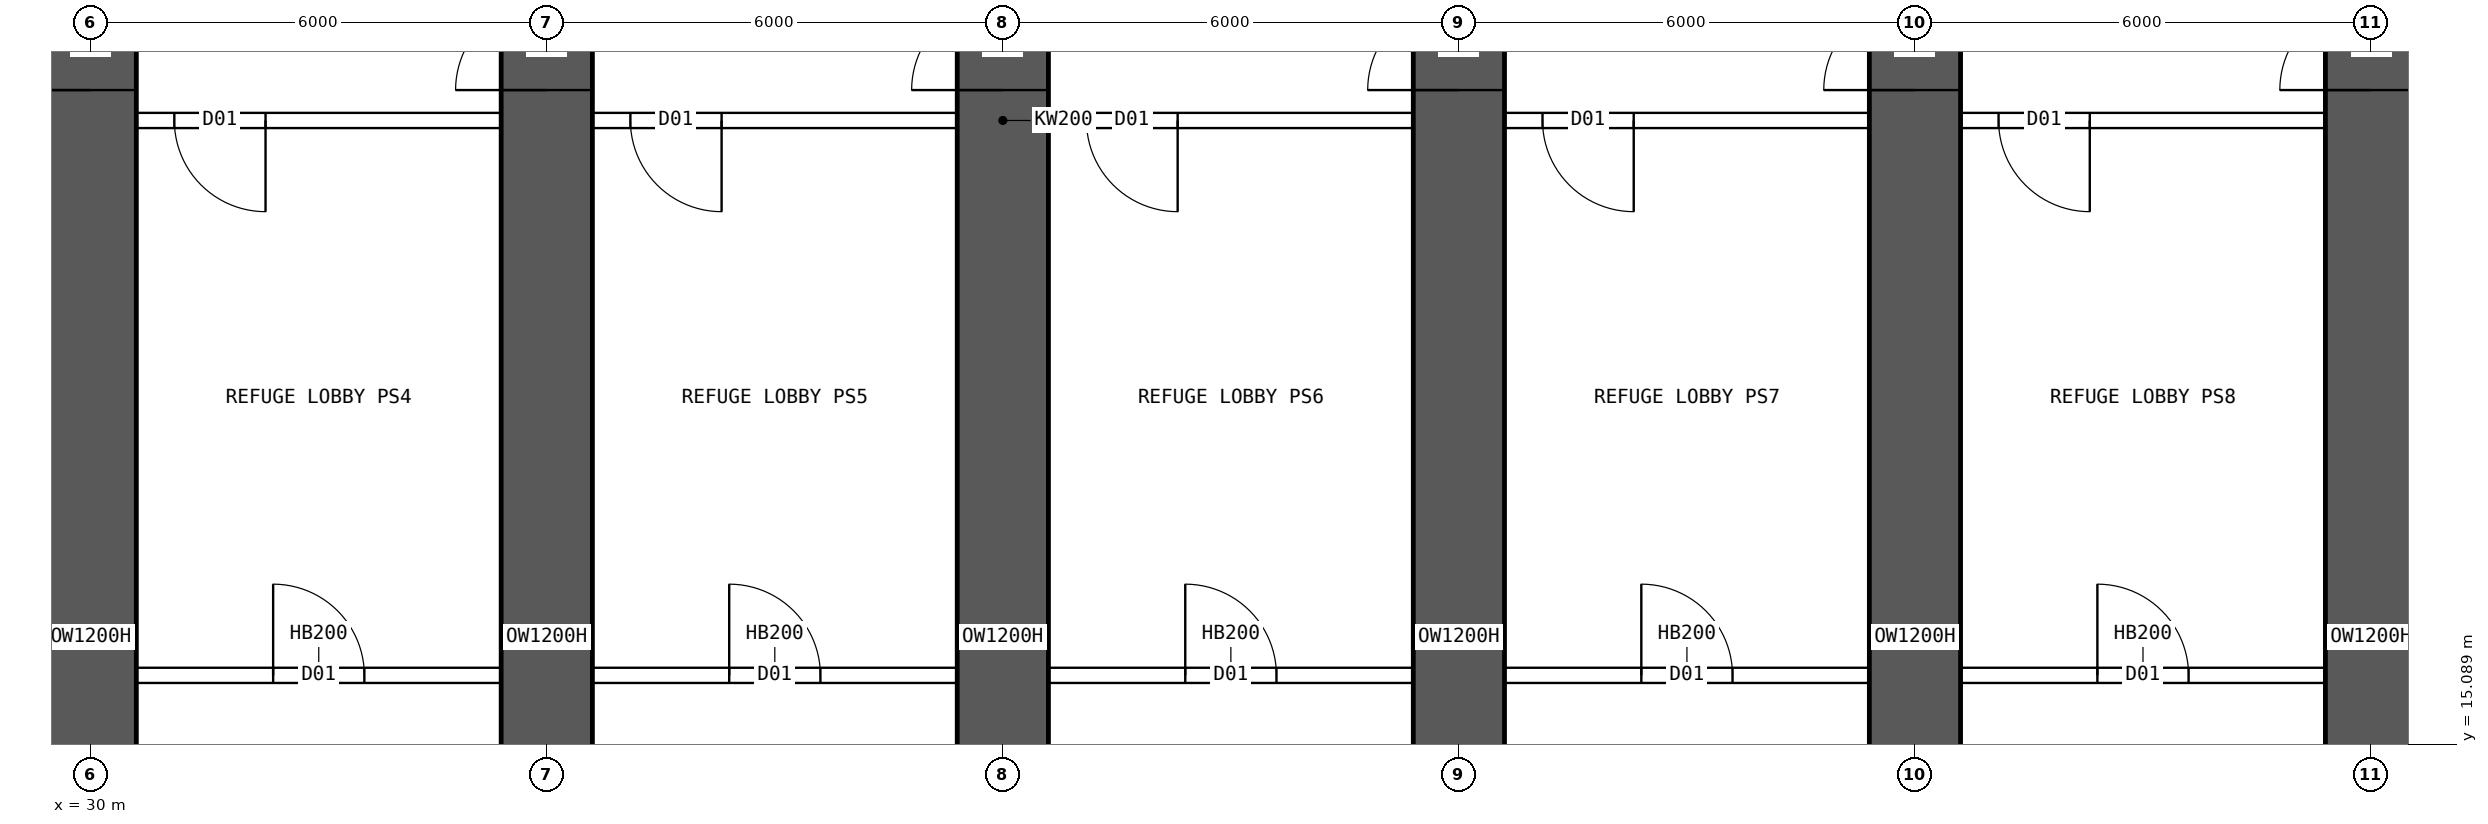
"""IFC4 building model, lengths in metres.
Left out: names, types, materials, properties, quantities, classifications, styles, units other than length and angle.
Written with IfcOpenShell. Run it as: python <this file> out.ifc"""

import sys

from ifc_helpers import new_model, si_unit, direction, frame, frame_2d, origin, place, context, subcontext, project, spatial, rectangle, extrude, element, fill, save


model = new_model("IFC4")
c1 = context("Model", 3, precision=1e-05, world=origin(), true_north=direction((0.0, 1.0)))
c2 = subcontext(c1, "Body", "Model", "MODEL_VIEW")
j1 = project(units=[si_unit("LENGTHUNIT", "METRE"), si_unit("PLANEANGLEUNIT", "RADIAN")], contexts=[c1])
p1 = place(None, origin())
s1 = spatial("IfcSite", under=j1, at=p1, CompositionType="ELEMENT")
p2 = place(p1, origin())
s2 = spatial("IfcBuilding", under=s1, at=p2, CompositionType="ELEMENT")
p3 = place(p2, frame((0.0, 0.0, 68.95)))
s3 = spatial("IfcBuildingStorey", under=s2, at=p3, CompositionType="ELEMENT", Elevation=68.95)
p4 = place(p3, frame((30.0, 7.7, 0.0), z_axis=(0.0, 0.0, 1.0), x_axis=(0.0, 1.0, 0.0)))
e1 = element("IfcWall", 1, at=p4, inside=s3, PredefinedType="SHEAR", context=c2, shape_type="SweptSolid", body=[
    extrude(rectangle(XDim=17.6, YDim=1.2, at=frame_2d((8.8, 0.0))), origin(), (0.0, 0.0, 1.0), 7.2),
])
p5 = place(p4, frame((16.0, 0.0, 0.0)))
e2 = element("IfcOpeningElement", 2, at=p5, cuts=e1, PredefinedType="OPENING", context=c2, shape_type="SweptSolid", body=[
    extrude(rectangle(XDim=1.2, YDim=2.1, at=frame_2d((0.6, 1.05))), frame((0.0, 0.61, 0.0), z_axis=(0.0, -1.0, 0.0), x_axis=(1.0, 0.0, 0.0)), (0.0, 0.0, 1.0), 1.22),
])
p6 = place(p3, frame((36.0, 7.7, 0.0), z_axis=(0.0, 0.0, 1.0), x_axis=(0.0, 1.0, 0.0)))
e3 = element("IfcWall", 3, at=p6, inside=s3, PredefinedType="SHEAR", context=c2, shape_type="SweptSolid", body=[
    extrude(rectangle(XDim=17.6, YDim=1.2, at=frame_2d((8.8, 0.0))), origin(), (0.0, 0.0, 1.0), 7.2),
])
p7 = place(p6, frame((16.0, 0.0, 0.0)))
e4 = element("IfcOpeningElement", 4, at=p7, cuts=e3, PredefinedType="OPENING", context=c2, shape_type="SweptSolid", body=[
    extrude(rectangle(XDim=1.2, YDim=2.1, at=frame_2d((0.6, 1.05))), frame((0.0, 0.61, 0.0), z_axis=(0.0, -1.0, 0.0), x_axis=(1.0, 0.0, 0.0)), (0.0, 0.0, 1.0), 1.22),
])
p8 = place(p3, frame((42.0, 7.7, 0.0), z_axis=(0.0, 0.0, 1.0), x_axis=(0.0, 1.0, 0.0)))
e5 = element("IfcWall", 5, at=p8, inside=s3, PredefinedType="SHEAR", context=c2, shape_type="SweptSolid", body=[
    extrude(rectangle(XDim=17.6, YDim=1.2, at=frame_2d((8.8, 0.0))), origin(), (0.0, 0.0, 1.0), 7.2),
])
p9 = place(p8, frame((16.0, 0.0, 0.0)))
e6 = element("IfcOpeningElement", 6, at=p9, cuts=e5, PredefinedType="OPENING", context=c2, shape_type="SweptSolid", body=[
    extrude(rectangle(XDim=1.2, YDim=2.1, at=frame_2d((0.6, 1.05))), frame((0.0, 0.61, 0.0), z_axis=(0.0, -1.0, 0.0), x_axis=(1.0, 0.0, 0.0)), (0.0, 0.0, 1.0), 1.22),
])
p10 = place(p3, frame((48.0, 7.7, 0.0), z_axis=(0.0, 0.0, 1.0), x_axis=(0.0, 1.0, 0.0)))
e7 = element("IfcWall", 7, at=p10, inside=s3, PredefinedType="SHEAR", context=c2, shape_type="SweptSolid", body=[
    extrude(rectangle(XDim=17.6, YDim=1.2, at=frame_2d((8.8, 0.0))), origin(), (0.0, 0.0, 1.0), 7.2),
])
p11 = place(p10, frame((16.0, 0.0, 0.0)))
e8 = element("IfcOpeningElement", 8, at=p11, cuts=e7, PredefinedType="OPENING", context=c2, shape_type="SweptSolid", body=[
    extrude(rectangle(XDim=1.2, YDim=2.1, at=frame_2d((0.6, 1.05))), frame((0.0, 0.61, 0.0), z_axis=(0.0, -1.0, 0.0), x_axis=(1.0, 0.0, 0.0)), (0.0, 0.0, 1.0), 1.22),
])
p12 = place(p3, frame((54.0, 7.7, 0.0), z_axis=(0.0, 0.0, 1.0), x_axis=(0.0, 1.0, 0.0)))
e9 = element("IfcWall", 9, at=p12, inside=s3, PredefinedType="SHEAR", context=c2, shape_type="SweptSolid", body=[
    extrude(rectangle(XDim=17.6, YDim=1.2, at=frame_2d((8.8, 0.0))), origin(), (0.0, 0.0, 1.0), 7.2),
])
p13 = place(p12, frame((16.0, 0.0, 0.0)))
e10 = element("IfcOpeningElement", 10, at=p13, cuts=e9, PredefinedType="OPENING", context=c2, shape_type="SweptSolid", body=[
    extrude(rectangle(XDim=1.2, YDim=2.1, at=frame_2d((0.6, 1.05))), frame((0.0, 0.61, 0.0), z_axis=(0.0, -1.0, 0.0), x_axis=(1.0, 0.0, 0.0)), (0.0, 0.0, 1.0), 1.22),
])
p14 = place(p3, frame((60.0, 7.7, 0.0), z_axis=(0.0, 0.0, 1.0), x_axis=(0.0, 1.0, 0.0)))
e11 = element("IfcWall", 11, at=p14, inside=s3, PredefinedType="SHEAR", context=c2, shape_type="SweptSolid", body=[
    extrude(rectangle(XDim=17.6, YDim=1.2, at=frame_2d((8.8, 0.0))), origin(), (0.0, 0.0, 1.0), 7.2),
])
p15 = place(p14, frame((16.0, 0.0, 0.0)))
e12 = element("IfcOpeningElement", 12, at=p15, cuts=e11, PredefinedType="OPENING", context=c2, shape_type="SweptSolid", body=[
    extrude(rectangle(XDim=1.2, YDim=2.1, at=frame_2d((0.6, 1.05))), frame((0.0, 0.61, 0.0), z_axis=(0.0, -1.0, 0.0), x_axis=(1.0, 0.0, 0.0)), (0.0, 0.0, 1.0), 1.22),
])
p16 = place(p3, frame((68.4, 23.3, 0.0), z_axis=(0.0, 0.0, 1.0), x_axis=(-1.0, 0.0, 0.0)))
e13 = element("IfcWall", 13, at=p16, inside=s3, PredefinedType="SOLIDWALL", context=c2, shape_type="SweptSolid", body=[
    extrude(rectangle(XDim=52.8, YDim=0.2, at=frame_2d((26.4, 0.0))), origin(), (0.0, 0.0, 1.0), 6.9),
])
p17 = place(p16, frame((51.0, 0.0, 0.0)))
e14 = element("IfcOpeningElement", 14, at=p17, cuts=e13, PredefinedType="OPENING", context=c2, shape_type="SweptSolid", body=[
    extrude(rectangle(XDim=1.2, YDim=2.1, at=frame_2d((0.6, 1.05))), frame((0.0, 0.11, 0.0), z_axis=(0.0, -1.0, 0.0), x_axis=(1.0, 0.0, 0.0)), (0.0, 0.0, 1.0), 0.22),
])
p18 = place(p16, frame((48.1, 0.0, 0.0)))
e15 = element("IfcOpeningElement", 15, at=p18, cuts=e13, PredefinedType="OPENING", context=c2, shape_type="SweptSolid", body=[
    extrude(rectangle(XDim=1.2, YDim=2.1, at=frame_2d((0.6, 1.05))), frame((0.0, 0.11, 0.0), z_axis=(0.0, -1.0, 0.0), x_axis=(1.0, 0.0, 0.0)), (0.0, 0.0, 1.0), 0.22),
])
p19 = place(p16, frame((42.1, 0.0, 0.0)))
e16 = element("IfcOpeningElement", 16, at=p19, cuts=e13, PredefinedType="OPENING", context=c2, shape_type="SweptSolid", body=[
    extrude(rectangle(XDim=1.2, YDim=2.1, at=frame_2d((0.6, 1.05))), frame((0.0, 0.11, 0.0), z_axis=(0.0, -1.0, 0.0), x_axis=(1.0, 0.0, 0.0)), (0.0, 0.0, 1.0), 0.22),
])
p20 = place(p16, frame((36.1, 0.0, 0.0)))
e17 = element("IfcOpeningElement", 17, at=p20, cuts=e13, PredefinedType="OPENING", context=c2, shape_type="SweptSolid", body=[
    extrude(rectangle(XDim=1.2, YDim=2.1, at=frame_2d((0.6, 1.05))), frame((0.0, 0.11, 0.0), z_axis=(0.0, -1.0, 0.0), x_axis=(1.0, 0.0, 0.0)), (0.0, 0.0, 1.0), 0.22),
])
p21 = place(p16, frame((30.1, 0.0, 0.0)))
e18 = element("IfcOpeningElement", 18, at=p21, cuts=e13, PredefinedType="OPENING", context=c2, shape_type="SweptSolid", body=[
    extrude(rectangle(XDim=1.2, YDim=2.1, at=frame_2d((0.6, 1.05))), frame((0.0, 0.11, 0.0), z_axis=(0.0, -1.0, 0.0), x_axis=(1.0, 0.0, 0.0)), (0.0, 0.0, 1.0), 0.22),
])
p22 = place(p16, frame((24.1, 0.0, 0.0)))
e19 = element("IfcOpeningElement", 19, at=p22, cuts=e13, PredefinedType="OPENING", context=c2, shape_type="SweptSolid", body=[
    extrude(rectangle(XDim=1.2, YDim=2.1, at=frame_2d((0.6, 1.05))), frame((0.0, 0.11, 0.0), z_axis=(0.0, -1.0, 0.0), x_axis=(1.0, 0.0, 0.0)), (0.0, 0.0, 1.0), 0.22),
])
p23 = place(p16, frame((18.1, 0.0, 0.0)))
e20 = element("IfcOpeningElement", 20, at=p23, cuts=e13, PredefinedType="OPENING", context=c2, shape_type="SweptSolid", body=[
    extrude(rectangle(XDim=1.2, YDim=2.1, at=frame_2d((0.6, 1.05))), frame((0.0, 0.11, 0.0), z_axis=(0.0, -1.0, 0.0), x_axis=(1.0, 0.0, 0.0)), (0.0, 0.0, 1.0), 0.22),
])
p24 = place(p16, frame((12.1, 0.0, 0.0)))
e21 = element("IfcOpeningElement", 21, at=p24, cuts=e13, PredefinedType="OPENING", context=c2, shape_type="SweptSolid", body=[
    extrude(rectangle(XDim=1.2, YDim=2.1, at=frame_2d((0.6, 1.05))), frame((0.0, 0.11, 0.0), z_axis=(0.0, -1.0, 0.0), x_axis=(1.0, 0.0, 0.0)), (0.0, 0.0, 1.0), 0.22),
])
p25 = place(p16, frame((6.1, 0.0, 0.0)))
e22 = element("IfcOpeningElement", 22, at=p25, cuts=e13, PredefinedType="OPENING", context=c2, shape_type="SweptSolid", body=[
    extrude(rectangle(XDim=1.2, YDim=2.1, at=frame_2d((0.6, 1.05))), frame((0.0, 0.11, 0.0), z_axis=(0.0, -1.0, 0.0), x_axis=(1.0, 0.0, 0.0)), (0.0, 0.0, 1.0), 0.22),
])
p26 = place(p16, frame((0.1, 0.0, 0.0)))
e23 = element("IfcOpeningElement", 23, at=p26, cuts=e13, PredefinedType="OPENING", context=c2, shape_type="SweptSolid", body=[
    extrude(rectangle(XDim=1.2, YDim=2.1, at=frame_2d((0.6, 1.05))), frame((0.0, 0.11, 0.0), z_axis=(0.0, -1.0, 0.0), x_axis=(1.0, 0.0, 0.0)), (0.0, 0.0, 1.0), 0.22),
])
p27 = place(p3, frame((30.5, 16.0, 0.0), z_axis=(0.0, 0.0, 1.0), x_axis=(1.0, 0.0, 0.0)))
e24 = element("IfcWall", 24, at=p27, inside=s3, PredefinedType="SOLIDWALL", context=c2, shape_type="SweptSolid", body=[
    extrude(rectangle(XDim=5.0, YDim=0.2, at=frame_2d((2.5, 0.0))), origin(), (0.0, 0.0, 1.0), 6.9),
])
p28 = place(p27, frame((1.9, 0.0, 0.0)))
e25 = element("IfcOpeningElement", 25, at=p28, cuts=e24, PredefinedType="OPENING", context=c2, shape_type="SweptSolid", body=[
    extrude(rectangle(XDim=1.2, YDim=2.1, at=frame_2d((0.6, 1.05))), frame((0.0, 0.11, 0.0), z_axis=(0.0, -1.0, 0.0), x_axis=(1.0, 0.0, 0.0)), (0.0, 0.0, 1.0), 0.22),
])
p29 = place(p3, frame((36.5, 16.0, 0.0), z_axis=(0.0, 0.0, 1.0), x_axis=(1.0, 0.0, 0.0)))
e26 = element("IfcWall", 26, at=p29, inside=s3, PredefinedType="SOLIDWALL", context=c2, shape_type="SweptSolid", body=[
    extrude(rectangle(XDim=5.0, YDim=0.2, at=frame_2d((2.5, 0.0))), origin(), (0.0, 0.0, 1.0), 6.9),
])
p30 = place(p29, frame((1.9, 0.0, 0.0)))
e27 = element("IfcOpeningElement", 27, at=p30, cuts=e26, PredefinedType="OPENING", context=c2, shape_type="SweptSolid", body=[
    extrude(rectangle(XDim=1.2, YDim=2.1, at=frame_2d((0.6, 1.05))), frame((0.0, 0.11, 0.0), z_axis=(0.0, -1.0, 0.0), x_axis=(1.0, 0.0, 0.0)), (0.0, 0.0, 1.0), 0.22),
])
p31 = place(p3, frame((42.5, 16.0, 0.0), z_axis=(0.0, 0.0, 1.0), x_axis=(1.0, 0.0, 0.0)))
e28 = element("IfcWall", 28, at=p31, inside=s3, PredefinedType="SOLIDWALL", context=c2, shape_type="SweptSolid", body=[
    extrude(rectangle(XDim=5.0, YDim=0.2, at=frame_2d((2.5, 0.0))), origin(), (0.0, 0.0, 1.0), 6.9),
])
p32 = place(p31, frame((1.9, 0.0, 0.0)))
e29 = element("IfcOpeningElement", 29, at=p32, cuts=e28, PredefinedType="OPENING", context=c2, shape_type="SweptSolid", body=[
    extrude(rectangle(XDim=1.2, YDim=2.1, at=frame_2d((0.6, 1.05))), frame((0.0, 0.11, 0.0), z_axis=(0.0, -1.0, 0.0), x_axis=(1.0, 0.0, 0.0)), (0.0, 0.0, 1.0), 0.22),
])
p33 = place(p3, frame((48.5, 16.0, 0.0), z_axis=(0.0, 0.0, 1.0), x_axis=(1.0, 0.0, 0.0)))
e30 = element("IfcWall", 30, at=p33, inside=s3, PredefinedType="SOLIDWALL", context=c2, shape_type="SweptSolid", body=[
    extrude(rectangle(XDim=5.0, YDim=0.2, at=frame_2d((2.5, 0.0))), origin(), (0.0, 0.0, 1.0), 6.9),
])
p34 = place(p33, frame((1.9, 0.0, 0.0)))
e31 = element("IfcOpeningElement", 31, at=p34, cuts=e30, PredefinedType="OPENING", context=c2, shape_type="SweptSolid", body=[
    extrude(rectangle(XDim=1.2, YDim=2.1, at=frame_2d((0.6, 1.05))), frame((0.0, 0.11, 0.0), z_axis=(0.0, -1.0, 0.0), x_axis=(1.0, 0.0, 0.0)), (0.0, 0.0, 1.0), 0.22),
])
p35 = place(p3, frame((54.5, 16.0, 0.0), z_axis=(0.0, 0.0, 1.0), x_axis=(1.0, 0.0, 0.0)))
e32 = element("IfcWall", 32, at=p35, inside=s3, PredefinedType="SOLIDWALL", context=c2, shape_type="SweptSolid", body=[
    extrude(rectangle(XDim=5.0, YDim=0.2, at=frame_2d((2.5, 0.0))), origin(), (0.0, 0.0, 1.0), 6.9),
])
p36 = place(p35, frame((1.9, 0.0, 0.0)))
e33 = element("IfcOpeningElement", 33, at=p36, cuts=e32, PredefinedType="OPENING", context=c2, shape_type="SweptSolid", body=[
    extrude(rectangle(XDim=1.2, YDim=2.1, at=frame_2d((0.6, 1.05))), frame((0.0, 0.11, 0.0), z_axis=(0.0, -1.0, 0.0), x_axis=(1.0, 0.0, 0.0)), (0.0, 0.0, 1.0), 0.22),
])
p37 = place(p28, origin())
e34 = element("IfcDoor", 34, at=p37, inside=s3, OperationType="SINGLE_SWING_LEFT", PredefinedType="DOOR", context=c2, shape_type="SweptSolid", body=[
    extrude(rectangle(XDim=1.2, YDim=2.1, at=frame_2d((0.6, 1.05))), frame((0.0, 0.025, 0.0), z_axis=(0.0, -1.0, 0.0), x_axis=(1.0, 0.0, 0.0)), (0.0, 0.0, 1.0), 0.05),
])
fill(e25, e34)
p38 = place(p30, origin())
e35 = element("IfcDoor", 35, at=p38, inside=s3, OperationType="SINGLE_SWING_LEFT", PredefinedType="DOOR", context=c2, shape_type="SweptSolid", body=[
    extrude(rectangle(XDim=1.2, YDim=2.1, at=frame_2d((0.6, 1.05))), frame((0.0, 0.025, 0.0), z_axis=(0.0, -1.0, 0.0), x_axis=(1.0, 0.0, 0.0)), (0.0, 0.0, 1.0), 0.05),
])
fill(e27, e35)
p39 = place(p32, origin())
e36 = element("IfcDoor", 36, at=p39, inside=s3, OperationType="SINGLE_SWING_LEFT", PredefinedType="DOOR", context=c2, shape_type="SweptSolid", body=[
    extrude(rectangle(XDim=1.2, YDim=2.1, at=frame_2d((0.6, 1.05))), frame((0.0, 0.025, 0.0), z_axis=(0.0, -1.0, 0.0), x_axis=(1.0, 0.0, 0.0)), (0.0, 0.0, 1.0), 0.05),
])
fill(e29, e36)
p40 = place(p34, origin())
e37 = element("IfcDoor", 37, at=p40, inside=s3, OperationType="SINGLE_SWING_LEFT", PredefinedType="DOOR", context=c2, shape_type="SweptSolid", body=[
    extrude(rectangle(XDim=1.2, YDim=2.1, at=frame_2d((0.6, 1.05))), frame((0.0, 0.025, 0.0), z_axis=(0.0, -1.0, 0.0), x_axis=(1.0, 0.0, 0.0)), (0.0, 0.0, 1.0), 0.05),
])
fill(e31, e37)
p41 = place(p36, origin())
e38 = element("IfcDoor", 38, at=p41, inside=s3, OperationType="SINGLE_SWING_LEFT", PredefinedType="DOOR", context=c2, shape_type="SweptSolid", body=[
    extrude(rectangle(XDim=1.2, YDim=2.1, at=frame_2d((0.6, 1.05))), frame((0.0, 0.025, 0.0), z_axis=(0.0, -1.0, 0.0), x_axis=(1.0, 0.0, 0.0)), (0.0, 0.0, 1.0), 0.05),
])
fill(e33, e38)
p42 = place(p20, origin())
e39 = element("IfcDoor", 39, at=p42, inside=s3, OperationType="SINGLE_SWING_LEFT", PredefinedType="DOOR", context=c2, shape_type="SweptSolid", body=[
    extrude(rectangle(XDim=1.2, YDim=2.1, at=frame_2d((0.6, 1.05))), frame((0.0, 0.025, 0.0), z_axis=(0.0, -1.0, 0.0), x_axis=(1.0, 0.0, 0.0)), (0.0, 0.0, 1.0), 0.05),
])
fill(e17, e39)
p43 = place(p21, origin())
e40 = element("IfcDoor", 40, at=p43, inside=s3, OperationType="SINGLE_SWING_LEFT", PredefinedType="DOOR", context=c2, shape_type="SweptSolid", body=[
    extrude(rectangle(XDim=1.2, YDim=2.1, at=frame_2d((0.6, 1.05))), frame((0.0, 0.025, 0.0), z_axis=(0.0, -1.0, 0.0), x_axis=(1.0, 0.0, 0.0)), (0.0, 0.0, 1.0), 0.05),
])
fill(e18, e40)
p44 = place(p22, origin())
e41 = element("IfcDoor", 41, at=p44, inside=s3, OperationType="SINGLE_SWING_LEFT", PredefinedType="DOOR", context=c2, shape_type="SweptSolid", body=[
    extrude(rectangle(XDim=1.2, YDim=2.1, at=frame_2d((0.6, 1.05))), frame((0.0, 0.025, 0.0), z_axis=(0.0, -1.0, 0.0), x_axis=(1.0, 0.0, 0.0)), (0.0, 0.0, 1.0), 0.05),
])
fill(e19, e41)
p45 = place(p23, origin())
e42 = element("IfcDoor", 42, at=p45, inside=s3, OperationType="SINGLE_SWING_LEFT", PredefinedType="DOOR", context=c2, shape_type="SweptSolid", body=[
    extrude(rectangle(XDim=1.2, YDim=2.1, at=frame_2d((0.6, 1.05))), frame((0.0, 0.025, 0.0), z_axis=(0.0, -1.0, 0.0), x_axis=(1.0, 0.0, 0.0)), (0.0, 0.0, 1.0), 0.05),
])
fill(e20, e42)
p46 = place(p24, origin())
e43 = element("IfcDoor", 43, at=p46, inside=s3, OperationType="SINGLE_SWING_LEFT", PredefinedType="DOOR", context=c2, shape_type="SweptSolid", body=[
    extrude(rectangle(XDim=1.2, YDim=2.1, at=frame_2d((0.6, 1.05))), frame((0.0, 0.025, 0.0), z_axis=(0.0, -1.0, 0.0), x_axis=(1.0, 0.0, 0.0)), (0.0, 0.0, 1.0), 0.05),
])
fill(e21, e43)
p47 = place(p5, origin())
e44 = element("IfcDoor", 44, at=p47, inside=s3, OperationType="SINGLE_SWING_LEFT", PredefinedType="DOOR", context=c2, shape_type="SweptSolid", body=[
    extrude(rectangle(XDim=1.2, YDim=2.1, at=frame_2d((0.6, 1.05))), frame((0.0, 0.025, 0.0), z_axis=(0.0, -1.0, 0.0), x_axis=(1.0, 0.0, 0.0)), (0.0, 0.0, 1.0), 0.05),
])
fill(e2, e44)
p48 = place(p7, origin())
e45 = element("IfcDoor", 45, at=p48, inside=s3, OperationType="SINGLE_SWING_LEFT", PredefinedType="DOOR", context=c2, shape_type="SweptSolid", body=[
    extrude(rectangle(XDim=1.2, YDim=2.1, at=frame_2d((0.6, 1.05))), frame((0.0, 0.025, 0.0), z_axis=(0.0, -1.0, 0.0), x_axis=(1.0, 0.0, 0.0)), (0.0, 0.0, 1.0), 0.05),
])
fill(e4, e45)
p49 = place(p9, origin())
e46 = element("IfcDoor", 46, at=p49, inside=s3, OperationType="SINGLE_SWING_LEFT", PredefinedType="DOOR", context=c2, shape_type="SweptSolid", body=[
    extrude(rectangle(XDim=1.2, YDim=2.1, at=frame_2d((0.6, 1.05))), frame((0.0, 0.025, 0.0), z_axis=(0.0, -1.0, 0.0), x_axis=(1.0, 0.0, 0.0)), (0.0, 0.0, 1.0), 0.05),
])
fill(e6, e46)
p50 = place(p11, origin())
e47 = element("IfcDoor", 47, at=p50, inside=s3, OperationType="SINGLE_SWING_LEFT", PredefinedType="DOOR", context=c2, shape_type="SweptSolid", body=[
    extrude(rectangle(XDim=1.2, YDim=2.1, at=frame_2d((0.6, 1.05))), frame((0.0, 0.025, 0.0), z_axis=(0.0, -1.0, 0.0), x_axis=(1.0, 0.0, 0.0)), (0.0, 0.0, 1.0), 0.05),
])
fill(e8, e47)
p51 = place(p13, origin())
e48 = element("IfcDoor", 48, at=p51, inside=s3, OperationType="SINGLE_SWING_LEFT", PredefinedType="DOOR", context=c2, shape_type="SweptSolid", body=[
    extrude(rectangle(XDim=1.2, YDim=2.1, at=frame_2d((0.6, 1.05))), frame((0.0, 0.025, 0.0), z_axis=(0.0, -1.0, 0.0), x_axis=(1.0, 0.0, 0.0)), (0.0, 0.0, 1.0), 0.05),
])
fill(e10, e48)
p52 = place(p15, origin())
e49 = element("IfcDoor", 49, at=p52, inside=s3, OperationType="SINGLE_SWING_LEFT", PredefinedType="DOOR", context=c2, shape_type="SweptSolid", body=[
    extrude(rectangle(XDim=1.2, YDim=2.1, at=frame_2d((0.6, 1.05))), frame((0.0, 0.025, 0.0), z_axis=(0.0, -1.0, 0.0), x_axis=(1.0, 0.0, 0.0)), (0.0, 0.0, 1.0), 0.05),
])
fill(e12, e49)
save(model, sys.argv[1])
